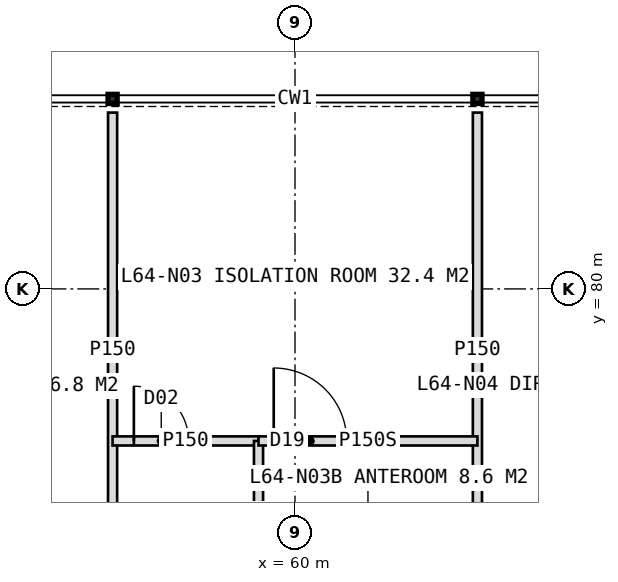
"""IFC4 building model, lengths in metres.
Left out: names, types, materials, properties, quantities, classifications, styles, units other than length and angle.
Written with IfcOpenShell. Run it as: python <this file> out.ifc"""

import sys

from ifc_helpers import new_model, si_unit, direction, frame, frame_2d, origin, place, context, subcontext, project, spatial, rectangle, extrude, element, fill, save


model = new_model("IFC4")
c1 = context("Model", 3, precision=1e-05, world=origin(), true_north=direction((0.0, 1.0)))
c2 = subcontext(c1, "Body", "Model", "MODEL_VIEW")
j1 = project(units=[si_unit("LENGTHUNIT", "METRE"), si_unit("PLANEANGLEUNIT", "RADIAN")], contexts=[c1])
p1 = place(None, origin())
s1 = spatial("IfcSite", under=j1, at=p1, CompositionType="ELEMENT")
p2 = place(p1, origin())
s2 = spatial("IfcBuilding", under=s1, at=p2, CompositionType="ELEMENT")
p3 = place(p2, frame((0.0, 0.0, 266.0)))
s3 = spatial("IfcBuildingStorey", under=s2, at=p3, CompositionType="ELEMENT", Elevation=266.0)
for number, where, z_axis, x_axis in (
    (1, (57.0, 75.1, 0.0), (0.0, 0.0, 1.0), (0.0, 1.0, 0.0)),
    (2, (63.0, 75.1, 0.0), (0.0, 0.0, 1.0), (0.0, 1.0, 0.0)),
):
    element("IfcWall", number, at=place(p3, frame(where, z_axis=z_axis, x_axis=x_axis)), inside=s3, PredefinedType="PARTITIONING", context=c2, shape_type="SweptSolid", body=[
        extrude(rectangle(XDim=7.8, YDim=0.15, at=frame_2d((3.9, 0.0))), origin(), (0.0, 0.0, 1.0), 3.75),
    ])
p4 = place(p3, frame((57.0, 77.5, 0.0), z_axis=(0.0, 0.0, 1.0), x_axis=(1.0, 0.0, 0.0)))
e3 = element("IfcWall", 3, at=p4, inside=s3, PredefinedType="PARTITIONING", context=c2, shape_type="SweptSolid", body=[
    extrude(rectangle(XDim=2.4, YDim=0.15, at=frame_2d((1.2, 0.0))), origin(), (0.0, 0.0, 1.0), 3.75),
])
p5 = place(p4, frame((0.35, 0.0, 0.0)))
e4 = element("IfcOpeningElement", 4, at=p5, cuts=e3, PredefinedType="OPENING", context=c2, shape_type="SweptSolid", body=[
    extrude(rectangle(XDim=0.9, YDim=2.1, at=frame_2d((0.45, 1.05))), frame((0.0, 0.085, 0.0), z_axis=(0.0, -1.0, 0.0), x_axis=(1.0, 0.0, 0.0)), (0.0, 0.0, 1.0), 0.17),
])
p6 = place(p3, frame((59.4, 75.1, 0.0), z_axis=(0.0, 0.0, 1.0), x_axis=(0.0, 1.0, 0.0)))
e5 = element("IfcWall", 5, at=p6, inside=s3, PredefinedType="PARTITIONING", context=c2, shape_type="SweptSolid", body=[
    extrude(rectangle(XDim=2.4, YDim=0.15, at=frame_2d((1.2, 0.0))), origin(), (0.0, 0.0, 1.0), 3.75),
])
p7 = place(p3, frame((59.4, 77.5, 0.0), z_axis=(0.0, 0.0, 1.0), x_axis=(1.0, 0.0, 0.0)))
e6 = element("IfcWall", 6, at=p7, inside=s3, PredefinedType="PARTITIONING", context=c2, shape_type="SweptSolid", body=[
    extrude(rectangle(XDim=3.6, YDim=0.15, at=frame_2d((1.8, 0.0))), origin(), (0.0, 0.0, 1.0), 3.75),
])
p8 = place(p7, frame((0.25, 0.0, 0.0)))
e7 = element("IfcOpeningElement", 7, at=p8, cuts=e6, PredefinedType="OPENING", context=c2, shape_type="SweptSolid", body=[
    extrude(rectangle(XDim=1.2, YDim=2.2, at=frame_2d((0.6, 1.1))), frame((0.0, 0.085, 0.0), z_axis=(0.0, -1.0, 0.0), x_axis=(1.0, 0.0, 0.0)), (0.0, 0.0, 1.0), 0.17),
])
p9 = place(p8, origin())
e8 = element("IfcDoor", 8, at=p9, inside=s3, OperationType="SINGLE_SWING_LEFT", PredefinedType="DOOR", context=c2, shape_type="SweptSolid", body=[
    extrude(rectangle(XDim=1.2, YDim=2.2, at=frame_2d((0.6, 1.1))), frame((0.0, 0.025, 0.0), z_axis=(0.0, -1.0, 0.0), x_axis=(1.0, 0.0, 0.0)), (0.0, 0.0, 1.0), 0.05),
])
fill(e7, e8)
p10 = place(p5, origin())
e9 = element("IfcDoor", 9, at=p10, inside=s3, OperationType="SINGLE_SWING_LEFT", PredefinedType="DOOR", context=c2, shape_type="SweptSolid", body=[
    extrude(rectangle(XDim=0.9, YDim=2.1, at=frame_2d((0.45, 1.05))), frame((0.0, 0.025, 0.0), z_axis=(0.0, -1.0, 0.0), x_axis=(1.0, 0.0, 0.0)), (0.0, 0.0, 1.0), 0.05),
])
fill(e4, e9)
save(model, sys.argv[1])
